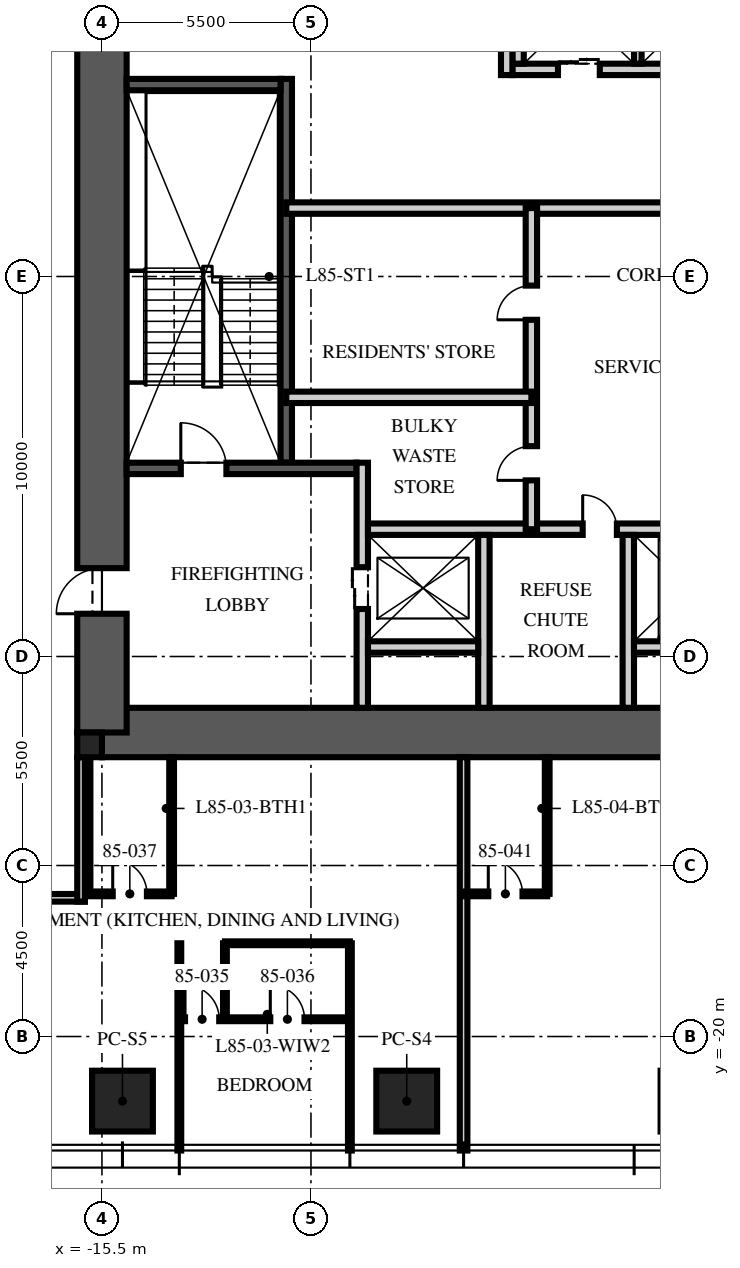
"""IFC4 building model, lengths in metres.
Left out: names, types, materials, properties, quantities, classifications, styles, units other than length and angle.
Written with IfcOpenShell. Run it as: python <this file> out.ifc"""

import sys

from ifc_helpers import new_model, si_unit, direction, frame, frame_2d, origin, origin_2d, place, context, subcontext, project, spatial, rectangle, extrude, element, fill, save


model = new_model("IFC4")
c1 = context("Model", 3, precision=1e-05, world=origin(), true_north=direction((0.0, 1.0)))
c2 = subcontext(c1, "Body", "Model", "MODEL_VIEW")
j1 = project(units=[si_unit("LENGTHUNIT", "METRE"), si_unit("PLANEANGLEUNIT", "RADIAN")], contexts=[c1])
p1 = place(None, origin())
s1 = spatial("IfcSite", under=j1, at=p1, CompositionType="ELEMENT")
p2 = place(p1, origin())
s2 = spatial("IfcBuilding", under=s1, at=p2, CompositionType="ELEMENT")
p3 = place(p2, frame((0.0, 0.0, 338.25)))
s3 = spatial("IfcBuildingStorey", under=s2, at=p3, CompositionType="ELEMENT", Elevation=338.25)
p4 = place(p3, frame((-15.5, -12.0, -0.25), z_axis=(0.0, 0.0, 1.0), x_axis=(1.0, 0.0, 0.0)))
e1 = element("IfcWall", 1, at=p4, inside=s3, PredefinedType="SHEAR", context=c2, shape_type="SweptSolid", body=[
    extrude(rectangle(XDim=31.0, YDim=1.3, at=frame_2d((15.5, 0.0))), origin(), (0.0, 0.0, 1.0), 3.75),
])
p5 = place(p3, frame((-15.5, -12.0, -0.25), z_axis=(0.0, 0.0, 1.0), x_axis=(0.0, 1.0, 0.0)))
e2 = element("IfcWall", 2, at=p5, inside=s3, PredefinedType="SHEAR", context=c2, shape_type="SweptSolid", body=[
    extrude(rectangle(XDim=24.0, YDim=1.3, at=frame_2d((12.0, 0.0))), origin(), (0.0, 0.0, 1.0), 3.75),
])
p6 = place(p5, frame((3.125, 0.0, 0.25)))
e3 = element("IfcOpeningElement", 3, at=p6, cuts=e2, PredefinedType="OPENING", context=c2, shape_type="SweptSolid", body=[
    extrude(rectangle(XDim=1.2, YDim=2.1, at=frame_2d((0.6, 1.05))), frame((0.0, 0.66, 0.0), z_axis=(0.0, -1.0, 0.0), x_axis=(1.0, 0.0, 0.0)), (0.0, 0.0, 1.0), 1.32),
])
p7 = place(p5, frame((19.375, 0.0, 0.25)))
e4 = element("IfcOpeningElement", 4, at=p7, cuts=e2, PredefinedType="OPENING", context=c2, shape_type="SweptSolid", body=[
    extrude(rectangle(XDim=1.8, YDim=2.1, at=frame_2d((0.9, 1.05))), frame((0.0, 0.66, 0.0), z_axis=(0.0, -1.0, 0.0), x_axis=(1.0, 0.0, 0.0)), (0.0, 0.0, 1.0), 1.32),
])
p8 = place(p3, frame((-15.825, -12.325, -0.25), z_axis=(0.0, 0.0, 1.0), x_axis=(1.0, 0.0, 0.0)))
e5 = element("IfcColumn", 5, at=p8, inside=s3, PredefinedType="COLUMN", context=c2, shape_type="SweptSolid", body=[
    extrude(rectangle(XDim=0.65, YDim=0.65, at=origin_2d()), origin(), (0.0, 0.0, 1.0), 3.75),
])
for number, where, z_axis, x_axis in (
    (6, (-7.48, -21.7, 0.0), (0.0, 0.0, 1.0), (1.0, 0.0, 0.0)),
    (7, (-14.96, -21.7, 0.0), (0.0, 0.0, 1.0), (1.0, 0.0, 0.0)),
):
    element("IfcColumn", number, at=place(p3, frame(where, z_axis=z_axis, x_axis=x_axis)), inside=s3, PredefinedType="COLUMN", context=c2, shape_type="SweptSolid", body=[
        extrude(rectangle(XDim=1.6, YDim=1.6, at=origin_2d()), origin(), (0.0, 0.0, 1.0), 3.75),
    ])
p9 = place(p3, frame((-10.65, -4.9, 0.0), z_axis=(0.0, 0.0, 1.0), x_axis=(0.0, 1.0, 0.0)))
e8 = element("IfcWall", 8, at=p9, inside=s3, PredefinedType="SOLIDWALL", context=c2, shape_type="SweptSolid", body=[
    extrude(rectangle(XDim=10.1, YDim=0.3, at=frame_2d((5.05, 0.0))), origin(), (0.0, 0.0, 1.0), 3.5),
])
p10 = place(p3, frame((-14.85, -5.05, 0.0), z_axis=(0.0, 0.0, 1.0), x_axis=(1.0, 0.0, 0.0)))
e9 = element("IfcWall", 9, at=p10, inside=s3, PredefinedType="SOLIDWALL", context=c2, shape_type="SweptSolid", body=[
    extrude(rectangle(XDim=6.05, YDim=0.3, at=frame_2d((3.025, 0.0))), origin(), (0.0, 0.0, 1.0), 3.5),
])
p11 = place(p10, frame((1.425, 0.0, 0.0)))
e10 = element("IfcOpeningElement", 10, at=p11, cuts=e9, PredefinedType="OPENING", context=c2, shape_type="SweptSolid", body=[
    extrude(rectangle(XDim=1.2, YDim=2.1, at=frame_2d((0.6, 1.05))), frame((0.0, 0.16, 0.0), z_axis=(0.0, -1.0, 0.0), x_axis=(1.0, 0.0, 0.0)), (0.0, 0.0, 1.0), 0.32),
])
p12 = place(p3, frame((-14.85, 5.05, 0.0), z_axis=(0.0, 0.0, 1.0), x_axis=(1.0, 0.0, 0.0)))
e11 = element("IfcWall", 11, at=p12, inside=s3, PredefinedType="SOLIDWALL", context=c2, shape_type="SweptSolid", body=[
    extrude(rectangle(XDim=4.05, YDim=0.3, at=frame_2d((2.025, 0.0))), origin(), (0.0, 0.0, 1.0), 3.5),
])
p13 = place(p3, frame((-8.65, -11.35, 0.0), z_axis=(0.0, 0.0, 1.0), x_axis=(0.0, 1.0, 0.0)))
e12 = element("IfcWall", 12, at=p13, inside=s3, PredefinedType="PARTITIONING", context=c2, shape_type="SweptSolid", body=[
    extrude(rectangle(XDim=6.45, YDim=0.3, at=frame_2d((3.225, 0.0))), origin(), (0.0, 0.0, 1.0), 3.5),
])
p14 = place(p13, frame((2.6, 0.0, 0.0)))
e13 = element("IfcOpeningElement", 13, at=p14, cuts=e12, PredefinedType="OPENING", context=c2, shape_type="SweptSolid", body=[
    extrude(rectangle(XDim=1.1, YDim=2.1, at=frame_2d((0.55, 1.05))), frame((0.0, 0.16, 0.0), z_axis=(0.0, -1.0, 0.0), x_axis=(1.0, 0.0, 0.0)), (0.0, 0.0, 1.0), 0.32),
])
p15 = place(p3, frame((-8.5, -6.65, 0.0), z_axis=(0.0, 0.0, 1.0), x_axis=(1.0, 0.0, 0.0)))
e14 = element("IfcWall", 14, at=p15, inside=s3, PredefinedType="PARTITIONING", context=c2, shape_type="SweptSolid", body=[
    extrude(rectangle(XDim=17.0, YDim=0.3, at=frame_2d((8.5, 0.0))), origin(), (0.0, 0.0, 1.0), 3.5),
])
p16 = place(p15, frame((7.8, 0.0, 0.0)))
e15 = element("IfcOpeningElement", 15, at=p16, cuts=e14, PredefinedType="OPENING", context=c2, shape_type="SweptSolid", body=[
    extrude(rectangle(XDim=1.3, YDim=2.4, at=frame_2d((0.65, 1.2))), frame((0.0, 0.16, 0.0), z_axis=(0.0, -1.0, 0.0), x_axis=(1.0, 0.0, 0.0)), (0.0, 0.0, 1.0), 0.32),
])
p17 = place(p15, frame((5.65, 0.0, 0.0)))
e16 = element("IfcOpeningElement", 16, at=p17, cuts=e14, PredefinedType="OPENING", context=c2, shape_type="SweptSolid", body=[
    extrude(rectangle(XDim=0.9, YDim=2.1, at=frame_2d((0.45, 1.05))), frame((0.0, 0.16, 0.0), z_axis=(0.0, -1.0, 0.0), x_axis=(1.0, 0.0, 0.0)), (0.0, 0.0, 1.0), 0.32),
])
p18 = place(p15, frame((10.4, 0.0, 0.0)))
e17 = element("IfcOpeningElement", 17, at=p18, cuts=e14, PredefinedType="OPENING", context=c2, shape_type="SweptSolid", body=[
    extrude(rectangle(XDim=0.9, YDim=2.1, at=frame_2d((0.45, 1.05))), frame((0.0, 0.16, 0.0), z_axis=(0.0, -1.0, 0.0), x_axis=(1.0, 0.0, 0.0)), (0.0, 0.0, 1.0), 0.32),
])
for number, where, z_axis, x_axis in (
    (18, (-5.45, -11.35, 0.0), (0.0, 0.0, 1.0), (0.0, 1.0, 0.0)),
    (19, (-1.65, -11.35, 0.0), (0.0, 0.0, 1.0), (0.0, 1.0, 0.0)),
):
    element("IfcWall", number, at=place(p3, frame(where, z_axis=z_axis, x_axis=x_axis)), inside=s3, PredefinedType="PARTITIONING", context=c2, shape_type="SweptSolid", body=[
        extrude(rectangle(XDim=4.55, YDim=0.3, at=frame_2d((2.275, 0.0))), origin(), (0.0, 0.0, 1.0), 3.5),
    ])
for number, where, z_axis, x_axis in (
    (20, (-8.5, -9.75, 0.0), (0.0, 0.0, 1.0), (1.0, 0.0, 0.0)),
    (21, (-1.5, -9.75, 0.0), (0.0, 0.0, 1.0), (1.0, 0.0, 0.0)),
):
    element("IfcWall", number, at=place(p3, frame(where, z_axis=z_axis, x_axis=x_axis)), inside=s3, PredefinedType="PARTITIONING", context=c2, shape_type="SweptSolid", body=[
        extrude(rectangle(XDim=2.9, YDim=0.3, at=frame_2d((1.45, 0.0))), origin(), (0.0, 0.0, 1.0), 3.5),
    ])
p19 = place(p3, frame((-4.7, 5.45, 0.0), z_axis=(0.0, 0.0, 1.0), x_axis=(1.0, 0.0, 0.0)))
e22 = element("IfcWall", 22, at=p19, inside=s3, PredefinedType="PARTITIONING", context=c2, shape_type="SweptSolid", body=[
    extrude(rectangle(XDim=9.7, YDim=0.3, at=frame_2d((4.85, 0.0))), origin(), (0.0, 0.0, 1.0), 3.5),
])
p20 = place(p19, frame((1.2, 0.0, 0.0)))
e23 = element("IfcOpeningElement", 23, at=p20, cuts=e22, PredefinedType="OPENING", context=c2, shape_type="SweptSolid", body=[
    extrude(rectangle(XDim=1.1, YDim=2.1, at=frame_2d((0.55, 1.05))), frame((0.0, 0.16, 0.0), z_axis=(0.0, -1.0, 0.0), x_axis=(1.0, 0.0, 0.0)), (0.0, 0.0, 1.0), 0.32),
])
p21 = place(p19, frame((4.3, 0.0, 0.0)))
e24 = element("IfcOpeningElement", 24, at=p21, cuts=e22, PredefinedType="OPENING", context=c2, shape_type="SweptSolid", body=[
    extrude(rectangle(XDim=1.1, YDim=2.1, at=frame_2d((0.55, 1.05))), frame((0.0, 0.16, 0.0), z_axis=(0.0, -1.0, 0.0), x_axis=(1.0, 0.0, 0.0)), (0.0, 0.0, 1.0), 0.32),
])
p22 = place(p19, frame((7.4, 0.0, 0.0)))
e25 = element("IfcOpeningElement", 25, at=p22, cuts=e22, PredefinedType="OPENING", context=c2, shape_type="SweptSolid", body=[
    extrude(rectangle(XDim=1.1, YDim=2.1, at=frame_2d((0.55, 1.05))), frame((0.0, 0.16, 0.0), z_axis=(0.0, -1.0, 0.0), x_axis=(1.0, 0.0, 0.0)), (0.0, 0.0, 1.0), 0.32),
])
p23 = place(p3, frame((-4.55, 5.6, 0.0), z_axis=(0.0, 0.0, 1.0), x_axis=(0.0, 1.0, 0.0)))
e26 = element("IfcWall", 26, at=p23, inside=s3, PredefinedType="PARTITIONING", context=c2, shape_type="SweptSolid", body=[
    extrude(rectangle(XDim=2.8, YDim=0.3, at=frame_2d((1.4, 0.0))), origin(), (0.0, 0.0, 1.0), 3.5),
])
p24 = place(p3, frame((-1.4, 5.6, 0.0), z_axis=(0.0, 0.0, 1.0), x_axis=(0.0, 1.0, 0.0)))
e27 = element("IfcWall", 27, at=p24, inside=s3, PredefinedType="PARTITIONING", context=c2, shape_type="SweptSolid", body=[
    extrude(rectangle(XDim=2.8, YDim=0.2, at=frame_2d((1.4, 0.0))), origin(), (0.0, 0.0, 1.0), 3.5),
])
p25 = place(p3, frame((-10.65, 1.8, 0.0), z_axis=(0.0, 0.0, 1.0), x_axis=(1.0, 0.0, 0.0)))
e28 = element("IfcWall", 28, at=p25, inside=s3, PredefinedType="PARTITIONING", context=c2, shape_type="SweptSolid", body=[
    extrude(rectangle(XDim=21.3, YDim=0.3, at=frame_2d((10.65, 0.0))), origin(), (0.0, 0.0, 1.0), 3.5),
])
p26 = place(p25, frame((10.05, 0.0, 0.0)))
e29 = element("IfcOpeningElement", 29, at=p26, cuts=e28, PredefinedType="OPENING", context=c2, shape_type="SweptSolid", body=[
    extrude(rectangle(XDim=1.2, YDim=2.1, at=frame_2d((0.6, 1.05))), frame((0.0, 0.16, 0.0), z_axis=(0.0, -1.0, 0.0), x_axis=(1.0, 0.0, 0.0)), (0.0, 0.0, 1.0), 0.32),
])
p27 = place(p25, frame((19.238, 0.0, 0.0)))
e30 = element("IfcOpeningElement", 30, at=p27, cuts=e28, PredefinedType="OPENING", context=c2, shape_type="SweptSolid", body=[
    extrude(rectangle(XDim=0.9, YDim=2.1, at=frame_2d((0.45, 1.05))), frame((0.0, 0.16, 0.0), z_axis=(0.0, -1.0, 0.0), x_axis=(1.0, 0.0, 0.0)), (0.0, 0.0, 1.0), 0.32),
])
p28 = place(p3, frame((-4.2, -6.65, 0.0), z_axis=(0.0, 0.0, 1.0), x_axis=(0.0, 1.0, 0.0)))
e31 = element("IfcWall", 31, at=p28, inside=s3, PredefinedType="PARTITIONING", context=c2, shape_type="SweptSolid", body=[
    extrude(rectangle(XDim=8.45, YDim=0.3, at=frame_2d((4.225, 0.0))), origin(), (0.0, 0.0, 1.0), 3.5),
])
p29 = place(p28, frame((1.285, 0.0, 0.0)))
e32 = element("IfcOpeningElement", 32, at=p29, cuts=e31, PredefinedType="OPENING", context=c2, shape_type="SweptSolid", body=[
    extrude(rectangle(XDim=0.9, YDim=2.1, at=frame_2d((0.45, 1.05))), frame((0.0, 0.16, 0.0), z_axis=(0.0, -1.0, 0.0), x_axis=(1.0, 0.0, 0.0)), (0.0, 0.0, 1.0), 0.32),
])
p30 = place(p28, frame((5.51, 0.0, 0.0)))
e33 = element("IfcOpeningElement", 33, at=p30, cuts=e31, PredefinedType="OPENING", context=c2, shape_type="SweptSolid", body=[
    extrude(rectangle(XDim=0.9, YDim=2.1, at=frame_2d((0.45, 1.05))), frame((0.0, 0.16, 0.0), z_axis=(0.0, -1.0, 0.0), x_axis=(1.0, 0.0, 0.0)), (0.0, 0.0, 1.0), 0.32),
])
p31 = place(p3, frame((-10.65, -3.18, 0.0), z_axis=(0.0, 0.0, 1.0), x_axis=(1.0, 0.0, 0.0)))
e34 = element("IfcWall", 34, at=p31, inside=s3, PredefinedType="PARTITIONING", context=c2, shape_type="SweptSolid", body=[
    extrude(rectangle(XDim=6.45, YDim=0.3, at=frame_2d((3.225, 0.0))), origin(), (0.0, 0.0, 1.0), 3.5),
])
p32 = place(p3, frame((-4.85, 5.3, 0.0), z_axis=(0.0, 0.0, 1.0), x_axis=(0.0, 1.0, 0.0)))
e35 = element("IfcWall", 35, at=p32, inside=s3, PredefinedType="PARTITIONING", context=c2, shape_type="SweptSolid", body=[
    extrude(rectangle(XDim=6.05, YDim=0.3, at=frame_2d((3.025, 0.0))), origin(), (0.0, 0.0, 1.0), 3.5),
])
p33 = place(p32, frame((4.225, 0.0, 0.0)))
e36 = element("IfcOpeningElement", 36, at=p33, cuts=e35, PredefinedType="OPENING", context=c2, shape_type="SweptSolid", body=[
    extrude(rectangle(XDim=0.9, YDim=2.1, at=frame_2d((0.45, 1.05))), frame((0.0, 0.16, 0.0), z_axis=(0.0, -1.0, 0.0), x_axis=(1.0, 0.0, 0.0)), (0.0, 0.0, 1.0), 0.32),
])
p34 = place(p3, frame((-19.15, -16.35, 0.0), z_axis=(0.0, 0.0, 1.0), x_axis=(1.0, 0.0, 0.0)))
e37 = element("IfcWall", 37, at=p34, inside=s3, PredefinedType="PARTITIONING", context=c2, shape_type="SweptSolid", body=[
    extrude(rectangle(XDim=3.2, YDim=0.2, at=frame_2d((1.6, 0.0))), origin(), (0.0, 0.0, 1.0), 2.6),
])
p35 = place(p3, frame((-16.05, -16.45, 0.0), z_axis=(0.0, 0.0, 1.0), x_axis=(0.0, 1.0, 0.0)))
e38 = element("IfcWall", 38, at=p35, inside=s3, PredefinedType="PARTITIONING", context=c2, shape_type="SweptSolid", body=[
    extrude(rectangle(XDim=3.8, YDim=0.2, at=frame_2d((1.9, 0.0))), origin(), (0.0, 0.0, 1.0), 2.6),
])
for number, where, z_axis, x_axis in (
    (39, (-13.464, -17.546, 0.0), (0.0, 0.0, 1.0), (0.0, -1.0, 0.0)),
    (40, (-8.976, -17.546, 0.0), (0.0, 0.0, 1.0), (0.0, -1.0, 0.0)),
):
    element("IfcWall", number, at=place(p3, frame(where, z_axis=z_axis, x_axis=x_axis)), inside=s3, PredefinedType="PARTITIONING", context=c2, shape_type="SweptSolid", body=[
        extrude(rectangle(XDim=5.454, YDim=0.1, at=frame_2d((2.727, 0.0))), origin(), (0.0, 0.0, 1.0), 3.01),
    ])
p36 = place(p3, frame((-5.984, -12.65, 0.0), z_axis=(0.0, 0.0, 1.0), x_axis=(0.0, -1.0, 0.0)))
e41 = element("IfcWall", 41, at=p36, inside=s3, PredefinedType="PARTITIONING", context=c2, shape_type="SweptSolid", body=[
    extrude(rectangle(XDim=10.35, YDim=0.2, at=frame_2d((5.175, 0.0))), origin(), (0.0, 0.0, 1.0), 3.01),
])
p37 = place(p3, frame((-13.464, -19.546, 0.0), z_axis=(0.0, 0.0, 1.0), x_axis=(1.0, 0.0, 0.0)))
e42 = element("IfcWall", 42, at=p37, inside=s3, PredefinedType="PARTITIONING", context=c2, shape_type="SweptSolid", body=[
    extrude(rectangle(XDim=4.488, YDim=0.1, at=frame_2d((2.244, 0.0))), origin(), (0.0, 0.0, 1.0), 2.91),
])
p38 = place(p37, frame((0.15, 0.0, 0.0)))
e43 = element("IfcOpeningElement", 43, at=p38, cuts=e42, PredefinedType="OPENING", context=c2, shape_type="SweptSolid", body=[
    extrude(rectangle(XDim=0.9, YDim=2.1, at=frame_2d((0.45, 1.05))), frame((0.0, 0.06, 0.0), z_axis=(0.0, -1.0, 0.0), x_axis=(1.0, 0.0, 0.0)), (0.0, 0.0, 1.0), 0.12),
])
p39 = place(p37, frame((2.394, 0.0, 0.0)))
e44 = element("IfcOpeningElement", 44, at=p39, cuts=e42, PredefinedType="OPENING", context=c2, shape_type="SweptSolid", body=[
    extrude(rectangle(XDim=0.9, YDim=2.1, at=frame_2d((0.45, 1.05))), frame((0.0, 0.06, 0.0), z_axis=(0.0, -1.0, 0.0), x_axis=(1.0, 0.0, 0.0)), (0.0, 0.0, 1.0), 0.12),
])
p40 = place(p3, frame((-12.264, -17.546, 0.0), z_axis=(0.0, 0.0, 1.0), x_axis=(0.0, -1.0, 0.0)))
e45 = element("IfcWall", 45, at=p40, inside=s3, PredefinedType="PARTITIONING", context=c2, shape_type="SweptSolid", body=[
    extrude(rectangle(XDim=2.0, YDim=0.1, at=frame_2d((1.0, 0.0))), origin(), (0.0, 0.0, 1.0), 3.5),
])
p41 = place(p3, frame((-12.264, -17.546, 0.0), z_axis=(0.0, 0.0, 1.0), x_axis=(1.0, 0.0, 0.0)))
e46 = element("IfcWall", 46, at=p41, inside=s3, PredefinedType="PARTITIONING", context=c2, shape_type="SweptSolid", body=[
    extrude(rectangle(XDim=3.288, YDim=0.1, at=frame_2d((1.644, 0.0))), origin(), (0.0, 0.0, 1.0), 2.91),
])
p42 = place(p3, frame((-15.866, -16.246, 0.0), z_axis=(0.0, 0.0, 1.0), x_axis=(1.0, 0.0, 0.0)))
e47 = element("IfcWall", 47, at=p42, inside=s3, PredefinedType="PARTITIONING", context=c2, shape_type="SweptSolid", body=[
    extrude(rectangle(XDim=2.2, YDim=0.125, at=frame_2d((1.1, 0.0))), origin(), (0.0, 0.0, 1.0), 2.9),
])
p43 = place(p42, frame((0.65, 0.0, 0.0)))
e48 = element("IfcOpeningElement", 48, at=p43, cuts=e47, PredefinedType="OPENING", context=c2, shape_type="SweptSolid", body=[
    extrude(rectangle(XDim=0.9, YDim=2.1, at=frame_2d((0.45, 1.05))), frame((0.0, 0.073, 0.0), z_axis=(0.0, -1.0, 0.0), x_axis=(1.0, 0.0, 0.0)), (0.0, 0.0, 1.0), 0.145),
])
p44 = place(p3, frame((-15.866, -12.65, 0.0), z_axis=(0.0, 0.0, 1.0), x_axis=(0.0, -1.0, 0.0)))
e49 = element("IfcWall", 49, at=p44, inside=s3, PredefinedType="PARTITIONING", context=c2, shape_type="SweptSolid", body=[
    extrude(rectangle(XDim=3.596, YDim=0.125, at=frame_2d((1.798, 0.0))), origin(), (0.0, 0.0, 1.0), 2.6),
])
p45 = place(p3, frame((-13.667, -12.65, 0.0), z_axis=(0.0, 0.0, 1.0), x_axis=(0.0, -1.0, 0.0)))
e50 = element("IfcWall", 50, at=p45, inside=s3, PredefinedType="PARTITIONING", context=c2, shape_type="SweptSolid", body=[
    extrude(rectangle(XDim=3.596, YDim=0.125, at=frame_2d((1.798, 0.0))), origin(), (0.0, 0.0, 1.0), 3.5),
])
p46 = place(p3, frame((-5.984, -16.246, 0.0), z_axis=(0.0, 0.0, 1.0), x_axis=(1.0, 0.0, 0.0)))
e51 = element("IfcWall", 51, at=p46, inside=s3, PredefinedType="PARTITIONING", context=c2, shape_type="SweptSolid", body=[
    extrude(rectangle(XDim=2.2, YDim=0.125, at=frame_2d((1.1, 0.0))), origin(), (0.0, 0.0, 1.0), 2.91),
])
p47 = place(p46, frame((0.65, 0.0, 0.0)))
e52 = element("IfcOpeningElement", 52, at=p47, cuts=e51, PredefinedType="OPENING", context=c2, shape_type="SweptSolid", body=[
    extrude(rectangle(XDim=0.9, YDim=2.1, at=frame_2d((0.45, 1.05))), frame((0.0, 0.073, 0.0), z_axis=(0.0, -1.0, 0.0), x_axis=(1.0, 0.0, 0.0)), (0.0, 0.0, 1.0), 0.145),
])
p48 = place(p3, frame((-3.784, -12.65, 0.0), z_axis=(0.0, 0.0, 1.0), x_axis=(0.0, -1.0, 0.0)))
e53 = element("IfcWall", 53, at=p48, inside=s3, PredefinedType="PARTITIONING", context=c2, shape_type="SweptSolid", body=[
    extrude(rectangle(XDim=3.596, YDim=0.125, at=frame_2d((1.798, 0.0))), origin(), (0.0, 0.0, 1.0), 2.91),
])
p49 = place(p11, origin())
e54 = element("IfcDoor", 54, at=p49, inside=s3, OperationType="SINGLE_SWING_LEFT", PredefinedType="DOOR", context=c2, shape_type="SweptSolid", body=[
    extrude(rectangle(XDim=1.2, YDim=2.1, at=frame_2d((0.6, 1.05))), frame((0.0, 0.025, 0.0), z_axis=(0.0, -1.0, 0.0), x_axis=(1.0, 0.0, 0.0)), (0.0, 0.0, 1.0), 0.05),
])
fill(e10, e54)
p50 = place(p6, origin())
e55 = element("IfcDoor", 55, at=p50, inside=s3, OperationType="SINGLE_SWING_LEFT", PredefinedType="DOOR", context=c2, shape_type="SweptSolid", body=[
    extrude(rectangle(XDim=1.2, YDim=2.1, at=frame_2d((0.6, 1.05))), frame((0.0, 0.025, 0.0), z_axis=(0.0, -1.0, 0.0), x_axis=(1.0, 0.0, 0.0)), (0.0, 0.0, 1.0), 0.05),
])
fill(e3, e55)
p51 = place(p14, origin())
e56 = element("IfcDoor", 56, at=p51, inside=s3, OperationType="DOUBLE_DOOR_SLIDING", PredefinedType="DOOR", context=c2, shape_type="SweptSolid", body=[
    extrude(rectangle(XDim=1.1, YDim=2.1, at=frame_2d((0.55, 1.05))), frame((0.0, 0.025, 0.0), z_axis=(0.0, -1.0, 0.0), x_axis=(1.0, 0.0, 0.0)), (0.0, 0.0, 1.0), 0.05),
])
fill(e13, e56)
p52 = place(p20, origin())
e57 = element("IfcDoor", 57, at=p52, inside=s3, OperationType="DOUBLE_DOOR_SLIDING", PredefinedType="DOOR", context=c2, shape_type="SweptSolid", body=[
    extrude(rectangle(XDim=1.1, YDim=2.1, at=frame_2d((0.55, 1.05))), frame((0.0, 0.025, 0.0), z_axis=(0.0, -1.0, 0.0), x_axis=(1.0, 0.0, 0.0)), (0.0, 0.0, 1.0), 0.05),
])
fill(e23, e57)
p53 = place(p17, origin())
e58 = element("IfcDoor", 58, at=p53, inside=s3, OperationType="SINGLE_SWING_LEFT", PredefinedType="DOOR", context=c2, shape_type="SweptSolid", body=[
    extrude(rectangle(XDim=0.9, YDim=2.1, at=frame_2d((0.45, 1.05))), frame((0.0, 0.025, 0.0), z_axis=(0.0, -1.0, 0.0), x_axis=(1.0, 0.0, 0.0)), (0.0, 0.0, 1.0), 0.05),
])
fill(e16, e58)
p54 = place(p29, origin())
e59 = element("IfcDoor", 59, at=p54, inside=s3, OperationType="SINGLE_SWING_LEFT", PredefinedType="DOOR", context=c2, shape_type="SweptSolid", body=[
    extrude(rectangle(XDim=0.9, YDim=2.1, at=frame_2d((0.45, 1.05))), frame((0.0, 0.025, 0.0), z_axis=(0.0, -1.0, 0.0), x_axis=(1.0, 0.0, 0.0)), (0.0, 0.0, 1.0), 0.05),
])
fill(e32, e59)
p55 = place(p30, origin())
e60 = element("IfcDoor", 60, at=p55, inside=s3, OperationType="SINGLE_SWING_LEFT", PredefinedType="DOOR", context=c2, shape_type="SweptSolid", body=[
    extrude(rectangle(XDim=0.9, YDim=2.1, at=frame_2d((0.45, 1.05))), frame((0.0, 0.025, 0.0), z_axis=(0.0, -1.0, 0.0), x_axis=(1.0, 0.0, 0.0)), (0.0, 0.0, 1.0), 0.05),
])
fill(e33, e60)
p56 = place(p38, origin())
e61 = element("IfcDoor", 61, at=p56, inside=s3, OperationType="SINGLE_SWING_LEFT", PredefinedType="DOOR", context=c2, shape_type="SweptSolid", body=[
    extrude(rectangle(XDim=0.9, YDim=2.1, at=frame_2d((0.45, 1.05))), frame((0.0, 0.025, 0.0), z_axis=(0.0, -1.0, 0.0), x_axis=(1.0, 0.0, 0.0)), (0.0, 0.0, 1.0), 0.05),
])
fill(e43, e61)
p57 = place(p39, origin())
e62 = element("IfcDoor", 62, at=p57, inside=s3, OperationType="SINGLE_SWING_LEFT", PredefinedType="DOOR", context=c2, shape_type="SweptSolid", body=[
    extrude(rectangle(XDim=0.9, YDim=2.1, at=frame_2d((0.45, 1.05))), frame((0.0, 0.025, 0.0), z_axis=(0.0, -1.0, 0.0), x_axis=(1.0, 0.0, 0.0)), (0.0, 0.0, 1.0), 0.05),
])
fill(e44, e62)
p58 = place(p43, origin())
e63 = element("IfcDoor", 63, at=p58, inside=s3, OperationType="SINGLE_SWING_LEFT", PredefinedType="DOOR", context=c2, shape_type="SweptSolid", body=[
    extrude(rectangle(XDim=0.9, YDim=2.1, at=frame_2d((0.45, 1.05))), frame((0.0, 0.025, 0.0), z_axis=(0.0, -1.0, 0.0), x_axis=(1.0, 0.0, 0.0)), (0.0, 0.0, 1.0), 0.05),
])
fill(e48, e63)
p59 = place(p47, origin())
e64 = element("IfcDoor", 64, at=p59, inside=s3, OperationType="SINGLE_SWING_LEFT", PredefinedType="DOOR", context=c2, shape_type="SweptSolid", body=[
    extrude(rectangle(XDim=0.9, YDim=2.1, at=frame_2d((0.45, 1.05))), frame((0.0, 0.025, 0.0), z_axis=(0.0, -1.0, 0.0), x_axis=(1.0, 0.0, 0.0)), (0.0, 0.0, 1.0), 0.05),
])
fill(e52, e64)
save(model, sys.argv[1])
